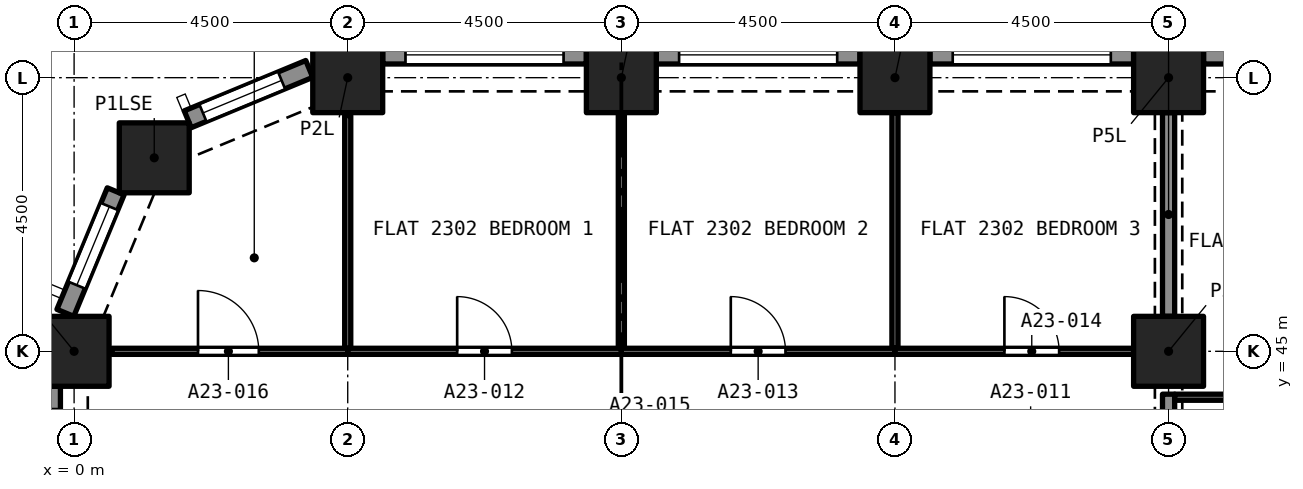
"""IFC4 building model, lengths in metres.
Left out: names, types, materials, properties, quantities, classifications, styles, units other than length and angle.
Written with IfcOpenShell. Run it as: python <this file> out.ifc"""

import sys

from ifc_helpers import new_model, si_unit, direction, frame, frame_2d, origin, origin_2d, place, context, subcontext, project, spatial, rectangle, extrude, element, fill, save


model = new_model("IFC4")
c1 = context("Model", 3, precision=1e-05, world=origin(), true_north=direction((0.0, 1.0)))
c2 = subcontext(c1, "Body", "Model", "MODEL_VIEW")
j1 = project(units=[si_unit("LENGTHUNIT", "METRE"), si_unit("PLANEANGLEUNIT", "RADIAN")], contexts=[c1])
p1 = place(None, origin())
s1 = spatial("IfcSite", under=j1, at=p1, CompositionType="ELEMENT")
p2 = place(p1, origin())
s2 = spatial("IfcBuilding", under=s1, at=p2, CompositionType="ELEMENT")
p3 = place(p2, frame((0.0, 0.0, 86.4)))
s3 = spatial("IfcBuildingStorey", under=s2, at=p3, CompositionType="ELEMENT", Elevation=86.4)
for number, where, z_axis, x_axis in (
    (1, (0.0, 45.0, 0.0), (0.0, 0.0, 1.0), (1.0, 0.0, 0.0)),
    (2, (18.0, 45.0, 0.0), (0.0, 0.0, 1.0), (1.0, 0.0, 0.0)),
    (3, (1.318, 48.182, 0.0), (0.0, 0.0, 1.0), (1.0, 0.0, 0.0)),
    (4, (4.5, 49.5, 0.0), (0.0, 0.0, 1.0), (1.0, 0.0, 0.0)),
    (5, (9.0, 49.5, 0.0), (0.0, 0.0, 1.0), (1.0, 0.0, 0.0)),
    (6, (13.5, 49.5, 0.0), (0.0, 0.0, 1.0), (1.0, 0.0, 0.0)),
    (7, (18.0, 49.5, 0.0), (0.0, 0.0, 1.0), (1.0, 0.0, 0.0)),
):
    element("IfcColumn", number, at=place(p3, frame(where, z_axis=z_axis, x_axis=x_axis)), inside=s3, PredefinedType="COLUMN", context=c2, shape_type="SweptSolid", body=[
        extrude(rectangle(XDim=1.15, YDim=1.15, at=origin_2d()), origin(), (0.0, 0.0, 1.0), 3.2),
    ])
p4 = place(p3, frame((18.575, 49.875, 0.0), z_axis=(0.0, 0.0, 1.0), x_axis=(1.0, 0.0, 0.0)))
e8 = element("IfcWall", 8, at=p4, inside=s3, PredefinedType="SOLIDWALL", context=c2, shape_type="SweptSolid", body=[
    extrude(rectangle(XDim=3.35, YDim=0.3, at=frame_2d((1.675, 0.0))), origin(), (0.0, 0.0, 1.0), 3.2),
])
p5 = place(p4, frame((0.375, 0.0, 0.45)))
e9 = element("IfcOpeningElement", 9, at=p5, cuts=e8, PredefinedType="OPENING", context=c2, shape_type="SweptSolid", body=[
    extrude(rectangle(XDim=2.6, YDim=1.95, at=frame_2d((1.3, 0.975))), frame((0.0, 0.16, 0.0), z_axis=(0.0, -1.0, 0.0), x_axis=(1.0, 0.0, 0.0)), (0.0, 0.0, 1.0), 0.32),
])
p6 = place(p3, frame((14.075, 49.875, 0.0), z_axis=(0.0, 0.0, 1.0), x_axis=(1.0, 0.0, 0.0)))
e10 = element("IfcWall", 10, at=p6, inside=s3, PredefinedType="SOLIDWALL", context=c2, shape_type="SweptSolid", body=[
    extrude(rectangle(XDim=3.35, YDim=0.3, at=frame_2d((1.675, 0.0))), origin(), (0.0, 0.0, 1.0), 3.2),
])
p7 = place(p6, frame((0.375, 0.0, 0.45)))
e11 = element("IfcOpeningElement", 11, at=p7, cuts=e10, PredefinedType="OPENING", context=c2, shape_type="SweptSolid", body=[
    extrude(rectangle(XDim=2.6, YDim=1.95, at=frame_2d((1.3, 0.975))), frame((0.0, 0.16, 0.0), z_axis=(0.0, -1.0, 0.0), x_axis=(1.0, 0.0, 0.0)), (0.0, 0.0, 1.0), 0.32),
])
p8 = place(p3, frame((9.575, 49.875, 0.0), z_axis=(0.0, 0.0, 1.0), x_axis=(1.0, 0.0, 0.0)))
e12 = element("IfcWall", 12, at=p8, inside=s3, PredefinedType="SOLIDWALL", context=c2, shape_type="SweptSolid", body=[
    extrude(rectangle(XDim=3.35, YDim=0.3, at=frame_2d((1.675, 0.0))), origin(), (0.0, 0.0, 1.0), 3.2),
])
p9 = place(p8, frame((0.375, 0.0, 0.45)))
e13 = element("IfcOpeningElement", 13, at=p9, cuts=e12, PredefinedType="OPENING", context=c2, shape_type="SweptSolid", body=[
    extrude(rectangle(XDim=2.6, YDim=1.95, at=frame_2d((1.3, 0.975))), frame((0.0, 0.16, 0.0), z_axis=(0.0, -1.0, 0.0), x_axis=(1.0, 0.0, 0.0)), (0.0, 0.0, 1.0), 0.32),
])
p10 = place(p3, frame((5.075, 49.875, 0.0), z_axis=(0.0, 0.0, 1.0), x_axis=(1.0, 0.0, 0.0)))
e14 = element("IfcWall", 14, at=p10, inside=s3, PredefinedType="SOLIDWALL", context=c2, shape_type="SweptSolid", body=[
    extrude(rectangle(XDim=3.35, YDim=0.3, at=frame_2d((1.675, 0.0))), origin(), (0.0, 0.0, 1.0), 3.2),
])
p11 = place(p10, frame((0.375, 0.0, 0.45)))
e15 = element("IfcOpeningElement", 15, at=p11, cuts=e14, PredefinedType="OPENING", context=c2, shape_type="SweptSolid", body=[
    extrude(rectangle(XDim=2.6, YDim=1.95, at=frame_2d((1.3, 0.975))), frame((0.0, 0.16, 0.0), z_axis=(0.0, -1.0, 0.0), x_axis=(1.0, 0.0, 0.0)), (0.0, 0.0, 1.0), 0.32),
])
p12 = place(p3, frame((1.869, 48.816, 0.0), z_axis=(0.0, 0.0, 1.0), x_axis=(0.923862802911, 0.382723818695, 0.0)))
e16 = element("IfcWall", 16, at=p12, inside=s3, PredefinedType="SOLIDWALL", context=c2, shape_type="SweptSolid", body=[
    extrude(rectangle(XDim=2.164, YDim=0.3, at=frame_2d((1.082, 0.0))), origin(), (0.0, 0.0, 1.0), 3.2),
])
p13 = place(p12, frame((0.271, 0.0, 0.45)))
e17 = element("IfcOpeningElement", 17, at=p13, cuts=e16, PredefinedType="OPENING", context=c2, shape_type="SweptSolid", body=[
    extrude(rectangle(XDim=1.4, YDim=1.95, at=frame_2d((0.7, 0.975))), frame((0.0, 0.16, 0.0), z_axis=(0.0, -1.0, 0.0), x_axis=(1.0, 0.0, 0.0)), (0.0, 0.0, 1.0), 0.32),
])
p14 = place(p3, frame((-0.144, 45.632, 0.0), z_axis=(0.0, 0.0, 1.0), x_axis=(0.382723818695, 0.923862802911, 0.0)))
e18 = element("IfcWall", 18, at=p14, inside=s3, PredefinedType="SOLIDWALL", context=c2, shape_type="SweptSolid", body=[
    extrude(rectangle(XDim=2.164, YDim=0.3, at=frame_2d((1.082, 0.0))), origin(), (0.0, 0.0, 1.0), 3.2),
])
p15 = place(p14, frame((0.493, 0.0, 0.45)))
e19 = element("IfcOpeningElement", 19, at=p15, cuts=e18, PredefinedType="OPENING", context=c2, shape_type="SweptSolid", body=[
    extrude(rectangle(XDim=1.4, YDim=1.95, at=frame_2d((0.7, 0.975))), frame((0.0, 0.16, 0.0), z_axis=(0.0, -1.0, 0.0), x_axis=(1.0, 0.0, 0.0)), (0.0, 0.0, 1.0), 0.32),
])
p16 = place(p3, frame((-0.375, 41.075, 0.0), z_axis=(0.0, 0.0, 1.0), x_axis=(0.0, 1.0, 0.0)))
e20 = element("IfcWall", 20, at=p16, inside=s3, PredefinedType="SOLIDWALL", context=c2, shape_type="SweptSolid", body=[
    extrude(rectangle(XDim=3.35, YDim=0.3, at=frame_2d((1.675, 0.0))), origin(), (0.0, 0.0, 1.0), 3.2),
])
p17 = place(p16, frame((0.375, 0.0, 0.45)))
e21 = element("IfcOpeningElement", 21, at=p17, cuts=e20, PredefinedType="OPENING", context=c2, shape_type="SweptSolid", body=[
    extrude(rectangle(XDim=2.6, YDim=1.95, at=frame_2d((1.3, 0.975))), frame((0.0, 0.16, 0.0), z_axis=(0.0, -1.0, 0.0), x_axis=(1.0, 0.0, 0.0)), (0.0, 0.0, 1.0), 0.32),
])
p18 = place(p3, frame((18.0, 41.075, 0.0), z_axis=(0.0, 0.0, 1.0), x_axis=(0.0, 1.0, 0.0)))
e22 = element("IfcWall", 22, at=p18, inside=s3, PredefinedType="PARTITIONING", context=c2, shape_type="SweptSolid", body=[
    extrude(rectangle(XDim=3.22, YDim=0.2, at=frame_2d((1.61, 0.0))), origin(), (0.0, 0.0, 1.0), 2.38),
])
p19 = place(p3, frame((9.0, 45.05, 0.0), z_axis=(0.0, 0.0, 1.0), x_axis=(0.0, 1.0, 0.0)))
e23 = element("IfcWall", 23, at=p19, inside=s3, PredefinedType="PARTITIONING", context=c2, shape_type="SweptSolid", body=[
    extrude(rectangle(XDim=3.875, YDim=0.1, at=frame_2d((1.938, 0.0))), origin(), (0.0, 0.0, 1.0), 2.9),
])
p20 = place(p3, frame((4.5, 45.0, 0.0), z_axis=(0.0, 0.0, 1.0), x_axis=(1.0, 0.0, 0.0)))
e24 = element("IfcWall", 24, at=p20, inside=s3, PredefinedType="PARTITIONING", context=c2, shape_type="SweptSolid", body=[
    extrude(rectangle(XDim=4.5, YDim=0.1, at=frame_2d((2.25, 0.0))), origin(), (0.0, 0.0, 1.0), 2.9),
])
p21 = place(p20, frame((1.8, 0.0, 0.0)))
e25 = element("IfcOpeningElement", 25, at=p21, cuts=e24, PredefinedType="OPENING", context=c2, shape_type="SweptSolid", body=[
    extrude(rectangle(XDim=0.9, YDim=2.1, at=frame_2d((0.45, 1.05))), frame((0.0, 0.06, 0.0), z_axis=(0.0, -1.0, 0.0), x_axis=(1.0, 0.0, 0.0)), (0.0, 0.0, 1.0), 0.12),
])
p22 = place(p3, frame((4.5, 45.05, 0.0), z_axis=(0.0, 0.0, 1.0), x_axis=(0.0, 1.0, 0.0)))
e26 = element("IfcWall", 26, at=p22, inside=s3, PredefinedType="PARTITIONING", context=c2, shape_type="SweptSolid", body=[
    extrude(rectangle(XDim=3.828, YDim=0.1, at=frame_2d((1.914, 0.0))), origin(), (0.0, 0.0, 1.0), 2.9),
])
p23 = place(p3, frame((13.5, 45.05, 0.0), z_axis=(0.0, 0.0, 1.0), x_axis=(0.0, 1.0, 0.0)))
e27 = element("IfcWall", 27, at=p23, inside=s3, PredefinedType="PARTITIONING", context=c2, shape_type="SweptSolid", body=[
    extrude(rectangle(XDim=3.875, YDim=0.1, at=frame_2d((1.938, 0.0))), origin(), (0.0, 0.0, 1.0), 2.9),
])
p24 = place(p3, frame((9.0, 45.0, 0.0), z_axis=(0.0, 0.0, 1.0), x_axis=(1.0, 0.0, 0.0)))
e28 = element("IfcWall", 28, at=p24, inside=s3, PredefinedType="PARTITIONING", context=c2, shape_type="SweptSolid", body=[
    extrude(rectangle(XDim=4.5, YDim=0.1, at=frame_2d((2.25, 0.0))), origin(), (0.0, 0.0, 1.0), 2.9),
])
p25 = place(p24, frame((1.8, 0.0, 0.0)))
e29 = element("IfcOpeningElement", 29, at=p25, cuts=e28, PredefinedType="OPENING", context=c2, shape_type="SweptSolid", body=[
    extrude(rectangle(XDim=0.9, YDim=2.1, at=frame_2d((0.45, 1.05))), frame((0.0, 0.06, 0.0), z_axis=(0.0, -1.0, 0.0), x_axis=(1.0, 0.0, 0.0)), (0.0, 0.0, 1.0), 0.12),
])
p26 = place(p3, frame((13.5, 45.0, 0.0), z_axis=(0.0, 0.0, 1.0), x_axis=(1.0, 0.0, 0.0)))
e30 = element("IfcWall", 30, at=p26, inside=s3, PredefinedType="PARTITIONING", context=c2, shape_type="SweptSolid", body=[
    extrude(rectangle(XDim=3.925, YDim=0.1, at=frame_2d((1.962, 0.0))), origin(), (0.0, 0.0, 1.0), 2.9),
])
p27 = place(p26, frame((1.8, 0.0, 0.0)))
e31 = element("IfcOpeningElement", 31, at=p27, cuts=e30, PredefinedType="OPENING", context=c2, shape_type="SweptSolid", body=[
    extrude(rectangle(XDim=0.9, YDim=2.1, at=frame_2d((0.45, 1.05))), frame((0.0, 0.06, 0.0), z_axis=(0.0, -1.0, 0.0), x_axis=(1.0, 0.0, 0.0)), (0.0, 0.0, 1.0), 0.12),
])
p28 = place(p3, frame((18.0, 45.575, 0.0), z_axis=(0.0, 0.0, 1.0), x_axis=(0.0, 1.0, 0.0)))
e32 = element("IfcWall", 32, at=p28, inside=s3, PredefinedType="PARTITIONING", context=c2, shape_type="SweptSolid", body=[
    extrude(rectangle(XDim=3.35, YDim=0.2, at=frame_2d((1.675, 0.0))), origin(), (0.0, 0.0, 1.0), 2.38),
])
p29 = place(p3, frame((0.622, 45.0, 0.0), z_axis=(0.0, 0.0, 1.0), x_axis=(1.0, 0.0, 0.0)))
e33 = element("IfcWall", 33, at=p29, inside=s3, PredefinedType="PARTITIONING", context=c2, shape_type="SweptSolid", body=[
    extrude(rectangle(XDim=3.878, YDim=0.1, at=frame_2d((1.939, 0.0))), origin(), (0.0, 0.0, 1.0), 2.9),
])
p30 = place(p29, frame((1.415, 0.0, 0.0)))
e34 = element("IfcOpeningElement", 34, at=p30, cuts=e33, PredefinedType="OPENING", context=c2, shape_type="SweptSolid", body=[
    extrude(rectangle(XDim=1.0, YDim=2.1, at=frame_2d((0.5, 1.05))), frame((0.0, 0.06, 0.0), z_axis=(0.0, -1.0, 0.0), x_axis=(1.0, 0.0, 0.0)), (0.0, 0.0, 1.0), 0.12),
])
p31 = place(p3, frame((18.1, 44.245, 0.0), z_axis=(0.0, 0.0, 1.0), x_axis=(1.0, 0.0, 0.0)))
e35 = element("IfcWall", 35, at=p31, inside=s3, PredefinedType="PARTITIONING", context=c2, shape_type="SweptSolid", body=[
    extrude(rectangle(XDim=4.4, YDim=0.1, at=frame_2d((2.2, 0.0))), origin(), (0.0, 0.0, 1.0), 2.75),
])
p32 = place(p31, frame((1.65, 0.0, 0.0)))
e36 = element("IfcOpeningElement", 36, at=p32, cuts=e35, PredefinedType="OPENING", context=c2, shape_type="SweptSolid", body=[
    extrude(rectangle(XDim=1.0, YDim=2.1, at=frame_2d((0.5, 1.05))), frame((0.0, 0.06, 0.0), z_axis=(0.0, -1.0, 0.0), x_axis=(1.0, 0.0, 0.0)), (0.0, 0.0, 1.0), 0.12),
])
p33 = place(p7, origin())
e37 = element("IfcWindow", 37, at=p33, inside=s3, PartitioningType="SINGLE_PANEL", PredefinedType="WINDOW", context=c2, shape_type="SweptSolid", body=[
    extrude(rectangle(XDim=2.6, YDim=1.95, at=frame_2d((1.3, 0.975))), frame((0.0, 0.03, 0.0), z_axis=(0.0, -1.0, 0.0), x_axis=(1.0, 0.0, 0.0)), (0.0, 0.0, 1.0), 0.06),
])
fill(e11, e37)
p34 = place(p9, origin())
e38 = element("IfcWindow", 38, at=p34, inside=s3, PartitioningType="SINGLE_PANEL", PredefinedType="WINDOW", context=c2, shape_type="SweptSolid", body=[
    extrude(rectangle(XDim=2.6, YDim=1.95, at=frame_2d((1.3, 0.975))), frame((0.0, 0.03, 0.0), z_axis=(0.0, -1.0, 0.0), x_axis=(1.0, 0.0, 0.0)), (0.0, 0.0, 1.0), 0.06),
])
fill(e13, e38)
p35 = place(p11, origin())
e39 = element("IfcWindow", 39, at=p35, inside=s3, PartitioningType="SINGLE_PANEL", PredefinedType="WINDOW", context=c2, shape_type="SweptSolid", body=[
    extrude(rectangle(XDim=2.6, YDim=1.95, at=frame_2d((1.3, 0.975))), frame((0.0, 0.03, 0.0), z_axis=(0.0, -1.0, 0.0), x_axis=(1.0, 0.0, 0.0)), (0.0, 0.0, 1.0), 0.06),
])
fill(e15, e39)
p36 = place(p13, origin())
e40 = element("IfcWindow", 40, at=p36, inside=s3, PartitioningType="SINGLE_PANEL", PredefinedType="WINDOW", context=c2, shape_type="SweptSolid", body=[
    extrude(rectangle(XDim=1.4, YDim=1.95, at=frame_2d((0.7, 0.975))), frame((0.0, 0.03, 0.0), z_axis=(0.0, -1.0, 0.0), x_axis=(1.0, 0.0, 0.0)), (0.0, 0.0, 1.0), 0.06),
])
fill(e17, e40)
p37 = place(p15, origin())
e41 = element("IfcWindow", 41, at=p37, inside=s3, PartitioningType="SINGLE_PANEL", PredefinedType="WINDOW", context=c2, shape_type="SweptSolid", body=[
    extrude(rectangle(XDim=1.4, YDim=1.95, at=frame_2d((0.7, 0.975))), frame((0.0, 0.03, 0.0), z_axis=(0.0, -1.0, 0.0), x_axis=(1.0, 0.0, 0.0)), (0.0, 0.0, 1.0), 0.06),
])
fill(e19, e41)
p38 = place(p21, origin())
e42 = element("IfcDoor", 42, at=p38, inside=s3, OperationType="SINGLE_SWING_RIGHT", PredefinedType="DOOR", context=c2, shape_type="SweptSolid", body=[
    extrude(rectangle(XDim=0.9, YDim=2.1, at=frame_2d((0.45, 1.05))), frame((0.0, 0.025, 0.0), z_axis=(0.0, -1.0, 0.0), x_axis=(1.0, 0.0, 0.0)), (0.0, 0.0, 1.0), 0.05),
])
fill(e25, e42)
p39 = place(p25, origin())
e43 = element("IfcDoor", 43, at=p39, inside=s3, OperationType="SINGLE_SWING_LEFT", PredefinedType="DOOR", context=c2, shape_type="SweptSolid", body=[
    extrude(rectangle(XDim=0.9, YDim=2.1, at=frame_2d((0.45, 1.05))), frame((0.0, 0.025, 0.0), z_axis=(0.0, -1.0, 0.0), x_axis=(1.0, 0.0, 0.0)), (0.0, 0.0, 1.0), 0.05),
])
fill(e29, e43)
p40 = place(p27, origin())
e44 = element("IfcDoor", 44, at=p40, inside=s3, OperationType="SINGLE_SWING_RIGHT", PredefinedType="DOOR", context=c2, shape_type="SweptSolid", body=[
    extrude(rectangle(XDim=0.9, YDim=2.1, at=frame_2d((0.45, 1.05))), frame((0.0, 0.025, 0.0), z_axis=(0.0, -1.0, 0.0), x_axis=(1.0, 0.0, 0.0)), (0.0, 0.0, 1.0), 0.05),
])
fill(e31, e44)
p41 = place(p30, origin())
e45 = element("IfcDoor", 45, at=p41, inside=s3, OperationType="SINGLE_SWING_LEFT", PredefinedType="DOOR", context=c2, shape_type="SweptSolid", body=[
    extrude(rectangle(XDim=1.0, YDim=2.1, at=frame_2d((0.5, 1.05))), frame((0.0, 0.025, 0.0), z_axis=(0.0, -1.0, 0.0), x_axis=(1.0, 0.0, 0.0)), (0.0, 0.0, 1.0), 0.05),
])
fill(e34, e45)
save(model, sys.argv[1])
